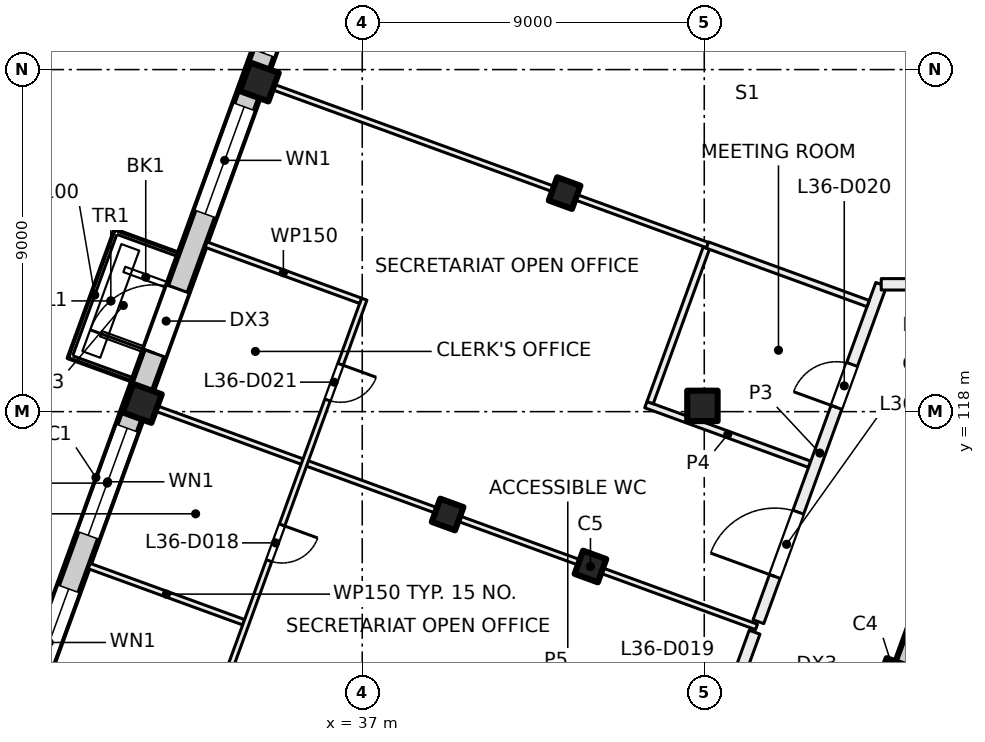
"""IFC4 building model, lengths in metres.
Left out: names, types, materials, properties, quantities, classifications, styles, units other than length and angle.
Written with IfcOpenShell. Run it as: python <this file> out.ifc"""

import sys

from ifc_helpers import new_model, si_unit, direction, frame, frame_2d, origin, origin_2d, place, context, subcontext, project, spatial, rectangle, extrude, element, fill, save


model = new_model("IFC4")
c1 = context("Model", 3, precision=1e-05, world=origin(), true_north=direction((0.0, 1.0)))
c2 = subcontext(c1, "Body", "Model", "MODEL_VIEW")
j1 = project(units=[si_unit("LENGTHUNIT", "METRE"), si_unit("PLANEANGLEUNIT", "RADIAN")], contexts=[c1])
p1 = place(None, origin())
s1 = spatial("IfcSite", under=j1, at=p1, CompositionType="ELEMENT")
p2 = place(p1, origin())
s2 = spatial("IfcBuilding", under=s1, at=p2, CompositionType="ELEMENT")
p3 = place(p2, frame((0.0, 0.0, 154.5)))
s3 = spatial("IfcBuildingStorey", under=s2, at=p3, CompositionType="ELEMENT", Elevation=154.5)
p4 = place(p3, frame((45.952, 118.152, 0.0), z_axis=(0.0, 0.0, 1.0), x_axis=(1.0, 0.0, 0.0)))
e1 = element("IfcColumn", 1, at=p4, inside=s3, PredefinedType="COLUMN", context=c2, shape_type="SweptSolid", body=[
    extrude(rectangle(XDim=0.8, YDim=0.8, at=origin_2d()), origin(), (0.0, 0.0, 1.0), 4.0),
])
for number, where, z_axis, x_axis in (
    (2, (43.006, 113.925, 0.0), (0.0, 0.0, 1.0), (-0.342, -0.94, 0.0)),
    (3, (42.325, 123.751, 0.0), (0.0, 0.0, 1.0), (-0.342, -0.94, 0.0)),
    (4, (39.247, 115.293, 0.0), (0.0, 0.0, 1.0), (-0.342, -0.94, 0.0)),
):
    element("IfcColumn", number, at=place(p3, frame(where, z_axis=z_axis, x_axis=x_axis)), inside=s3, PredefinedType="COLUMN", context=c2, shape_type="SweptSolid", body=[
        extrude(rectangle(XDim=0.65, YDim=0.65, at=origin_2d()), origin(), (0.0, 0.0, 1.0), 4.0),
    ])
for number, where, z_axis, x_axis in (
    (5, (51.04, 111.001, 0.0), (0.0, 0.0, 1.0), (-0.342, -0.94, 0.0)),
    (6, (34.291, 126.675, 0.0), (0.0, 0.0, 1.0), (-0.342, -0.94, 0.0)),
    (7, (31.212, 118.218, 0.0), (0.0, 0.0, 1.0), (-0.342, -0.94, 0.0)),
):
    element("IfcColumn", number, at=place(p3, frame(where, z_axis=z_axis, x_axis=x_axis)), inside=s3, PredefinedType="COLUMN", context=c2, shape_type="SweptSolid", body=[
        extrude(rectangle(XDim=0.8, YDim=0.8, at=origin_2d()), origin(), (0.0, 0.0, 1.0), 4.0),
    ])
p5 = place(p3, frame((52.212, 113.783, 0.0), z_axis=(0.0, 0.0, 1.0), x_axis=(-0.34202521188, -0.939690775968, 0.0)))
e8 = element("IfcWall", 8, at=p5, inside=s3, PredefinedType="SOLIDWALL", context=c2, shape_type="SweptSolid", body=[
    extrude(rectangle(XDim=21.745, YDim=0.6, at=frame_2d((10.873, 0.0))), origin(), (0.0, 0.0, 1.0), 3.625),
])
p6 = place(p5, frame((4.365, 0.0, 0.0)))
e9 = element("IfcOpeningElement", 9, at=p6, cuts=e8, PredefinedType="OPENING", context=c2, shape_type="SweptSolid", body=[
    extrude(rectangle(XDim=1.8, YDim=2.4, at=frame_2d((0.9, 1.2))), frame((0.0, 0.31, 0.0), z_axis=(0.0, -1.0, 0.0), x_axis=(1.0, 0.0, 0.0)), (0.0, 0.0, 1.0), 0.62),
])
p7 = place(p5, frame((8.265, 0.0, 0.9)))
e10 = element("IfcOpeningElement", 10, at=p7, cuts=e8, PredefinedType="OPENING", context=c2, shape_type="SweptSolid", body=[
    extrude(rectangle(XDim=3.0, YDim=2.4, at=frame_2d((1.5, 1.2))), frame((0.0, 0.31, 0.0), z_axis=(0.0, -1.0, 0.0), x_axis=(1.0, 0.0, 0.0)), (0.0, 0.0, 1.0), 0.62),
])
p8 = place(p5, frame((12.765, 0.0, 0.9)))
e11 = element("IfcOpeningElement", 11, at=p8, cuts=e8, PredefinedType="OPENING", context=c2, shape_type="SweptSolid", body=[
    extrude(rectangle(XDim=3.0, YDim=2.4, at=frame_2d((1.5, 1.2))), frame((0.0, 0.31, 0.0), z_axis=(0.0, -1.0, 0.0), x_axis=(1.0, 0.0, 0.0)), (0.0, 0.0, 1.0), 0.62),
])
p9 = place(p5, frame((17.265, 0.0, 0.9)))
e12 = element("IfcOpeningElement", 12, at=p9, cuts=e8, PredefinedType="OPENING", context=c2, shape_type="SweptSolid", body=[
    extrude(rectangle(XDim=3.0, YDim=2.4, at=frame_2d((1.5, 1.2))), frame((0.0, 0.31, 0.0), z_axis=(0.0, -1.0, 0.0), x_axis=(1.0, 0.0, 0.0)), (0.0, 0.0, 1.0), 0.62),
])
p10 = place(p3, frame((24.666, 100.669, 0.0), z_axis=(0.0, 0.0, 1.0), x_axis=(0.34201964167, 0.939692803373, 0.0)))
e13 = element("IfcWall", 13, at=p10, inside=s3, PredefinedType="SOLIDWALL", context=c2, shape_type="SweptSolid", body=[
    extrude(rectangle(XDim=32.884, YDim=0.6, at=frame_2d((16.442, 0.0))), origin(), (0.0, 0.0, 1.0), 3.625),
])
p11 = place(p10, frame((1.48, 0.0, 0.9)))
e14 = element("IfcOpeningElement", 14, at=p11, cuts=e13, PredefinedType="OPENING", context=c2, shape_type="SweptSolid", body=[
    extrude(rectangle(XDim=3.0, YDim=2.4, at=frame_2d((1.5, 1.2))), frame((0.0, 0.31, 0.0), z_axis=(0.0, -1.0, 0.0), x_axis=(1.0, 0.0, 0.0)), (0.0, 0.0, 1.0), 0.62),
])
p12 = place(p10, frame((5.98, 0.0, 0.9)))
e15 = element("IfcOpeningElement", 15, at=p12, cuts=e13, PredefinedType="OPENING", context=c2, shape_type="SweptSolid", body=[
    extrude(rectangle(XDim=3.0, YDim=2.4, at=frame_2d((1.5, 1.2))), frame((0.0, 0.31, 0.0), z_axis=(0.0, -1.0, 0.0), x_axis=(1.0, 0.0, 0.0)), (0.0, 0.0, 1.0), 0.62),
])
p13 = place(p10, frame((10.48, 0.0, 0.9)))
e16 = element("IfcOpeningElement", 16, at=p13, cuts=e13, PredefinedType="OPENING", context=c2, shape_type="SweptSolid", body=[
    extrude(rectangle(XDim=3.0, YDim=2.4, at=frame_2d((1.5, 1.2))), frame((0.0, 0.31, 0.0), z_axis=(0.0, -1.0, 0.0), x_axis=(1.0, 0.0, 0.0)), (0.0, 0.0, 1.0), 0.62),
])
p14 = place(p10, frame((14.98, 0.0, 0.9)))
e17 = element("IfcOpeningElement", 17, at=p14, cuts=e13, PredefinedType="OPENING", context=c2, shape_type="SweptSolid", body=[
    extrude(rectangle(XDim=3.0, YDim=2.4, at=frame_2d((1.5, 1.2))), frame((0.0, 0.31, 0.0), z_axis=(0.0, -1.0, 0.0), x_axis=(1.0, 0.0, 0.0)), (0.0, 0.0, 1.0), 0.62),
])
p15 = place(p10, frame((20.08, 0.0, 0.0)))
e18 = element("IfcOpeningElement", 18, at=p15, cuts=e13, PredefinedType="OPENING", context=c2, shape_type="SweptSolid", body=[
    extrude(rectangle(XDim=1.8, YDim=2.4, at=frame_2d((0.9, 1.2))), frame((0.0, 0.31, 0.0), z_axis=(0.0, -1.0, 0.0), x_axis=(1.0, 0.0, 0.0)), (0.0, 0.0, 1.0), 0.62),
])
p16 = place(p10, frame((23.98, 0.0, 0.9)))
e19 = element("IfcOpeningElement", 19, at=p16, cuts=e13, PredefinedType="OPENING", context=c2, shape_type="SweptSolid", body=[
    extrude(rectangle(XDim=3.0, YDim=2.4, at=frame_2d((1.5, 1.2))), frame((0.0, 0.31, 0.0), z_axis=(0.0, -1.0, 0.0), x_axis=(1.0, 0.0, 0.0)), (0.0, 0.0, 1.0), 0.62),
])
p17 = place(p10, frame((28.48, 0.0, 0.9)))
e20 = element("IfcOpeningElement", 20, at=p17, cuts=e13, PredefinedType="OPENING", context=c2, shape_type="SweptSolid", body=[
    extrude(rectangle(XDim=3.0, YDim=2.4, at=frame_2d((1.5, 1.2))), frame((0.0, 0.31, 0.0), z_axis=(0.0, -1.0, 0.0), x_axis=(1.0, 0.0, 0.0)), (0.0, 0.0, 1.0), 0.62),
])
p18 = place(p3, frame((29.814, 113.938, 0.0), z_axis=(0.0, 0.0, 1.0), x_axis=(0.93973078783, -0.341915262023, 0.0)))
e21 = element("IfcWall", 21, at=p18, inside=s3, PredefinedType="PARTITIONING", context=c2, shape_type="SweptSolid", body=[
    extrude(rectangle(XDim=4.326, YDim=0.15, at=frame_2d((2.163, 0.0))), origin(), (0.0, 0.0, 1.0), 3.625),
])
p19 = place(p3, frame((31.353, 118.166, 0.0), z_axis=(0.0, 0.0, 1.0), x_axis=(0.939701413127, -0.341995985602, 0.0)))
e22 = element("IfcWall", 22, at=p19, inside=s3, PredefinedType="PARTITIONING", context=c2, shape_type="SweptSolid", body=[
    extrude(rectangle(XDim=17.05, YDim=0.15, at=frame_2d((8.525, 0.0))), origin(), (0.0, 0.0, 1.0), 3.625),
])
p20 = place(p3, frame((37.053, 120.96, 0.0), z_axis=(0.0, 0.0, 1.0), x_axis=(-0.342023551531, -0.939691380293, 0.0)))
e23 = element("IfcWall", 23, at=p20, inside=s3, PredefinedType="PARTITIONING", context=c2, shape_type="SweptSolid", body=[
    extrude(rectangle(XDim=13.488, YDim=0.15, at=frame_2d((6.744, 0.0))), origin(), (0.0, 0.0, 1.0), 3.625),
])
p21 = place(p20, frame((10.791, 0.0, 0.0)))
e24 = element("IfcOpeningElement", 24, at=p21, cuts=e23, PredefinedType="OPENING", context=c2, shape_type="SweptSolid", body=[
    extrude(rectangle(XDim=1.0, YDim=2.1, at=frame_2d((0.5, 1.05))), frame((0.0, 0.085, 0.0), z_axis=(0.0, -1.0, 0.0), x_axis=(1.0, 0.0, 0.0)), (0.0, 0.0, 1.0), 0.17),
])
p22 = place(p20, frame((6.324, 0.0, 0.0)))
e25 = element("IfcOpeningElement", 25, at=p22, cuts=e23, PredefinedType="OPENING", context=c2, shape_type="SweptSolid", body=[
    extrude(rectangle(XDim=1.0, YDim=2.1, at=frame_2d((0.5, 1.05))), frame((0.0, 0.085, 0.0), z_axis=(0.0, -1.0, 0.0), x_axis=(1.0, 0.0, 0.0)), (0.0, 0.0, 1.0), 0.17),
])
p23 = place(p20, frame((1.824, 0.0, 0.0)))
e26 = element("IfcOpeningElement", 26, at=p23, cuts=e23, PredefinedType="OPENING", context=c2, shape_type="SweptSolid", body=[
    extrude(rectangle(XDim=1.0, YDim=2.1, at=frame_2d((0.5, 1.05))), frame((0.0, 0.085, 0.0), z_axis=(0.0, -1.0, 0.0), x_axis=(1.0, 0.0, 0.0)), (0.0, 0.0, 1.0), 0.17),
])
p24 = place(p3, frame((32.892, 122.395, 0.0), z_axis=(0.0, 0.0, 1.0), x_axis=(0.93973078783, -0.341915262023, 0.0)))
e27 = element("IfcWall", 27, at=p24, inside=s3, PredefinedType="PARTITIONING", context=c2, shape_type="SweptSolid", body=[
    extrude(rectangle(XDim=4.326, YDim=0.15, at=frame_2d((2.163, 0.0))), origin(), (0.0, 0.0, 1.0), 3.625),
])
p25 = place(p3, frame((47.325, 112.197, 0.0), z_axis=(0.0, 0.0, 1.0), x_axis=(-0.341976837053, -0.93970838185, 0.0)))
e28 = element("IfcWall", 28, at=p25, inside=s3, PredefinedType="PARTITIONING", context=c2, shape_type="SweptSolid", body=[
    extrude(rectangle(XDim=13.416, YDim=0.3, at=frame_2d((6.708, 0.0))), origin(), (0.0, 0.0, 1.0), 3.625),
])
p26 = place(p25, frame((8.354, 0.0, 0.0)))
e29 = element("IfcOpeningElement", 29, at=p26, cuts=e28, PredefinedType="OPENING", context=c2, shape_type="SweptSolid", body=[
    extrude(rectangle(XDim=1.0, YDim=2.1, at=frame_2d((0.5, 1.05))), frame((0.0, 0.16, 0.0), z_axis=(0.0, -1.0, 0.0), x_axis=(1.0, 0.0, 0.0)), (0.0, 0.0, 1.0), 0.32),
])
p27 = place(p25, frame((1.267, 0.0, 0.0)))
e30 = element("IfcOpeningElement", 30, at=p27, cuts=e28, PredefinedType="OPENING", context=c2, shape_type="SweptSolid", body=[
    extrude(rectangle(XDim=1.8, YDim=2.1, at=frame_2d((0.9, 1.05))), frame((0.0, 0.16, 0.0), z_axis=(0.0, -1.0, 0.0), x_axis=(1.0, 0.0, 0.0)), (0.0, 0.0, 1.0), 0.32),
])
p28 = place(p3, frame((44.463, 118.184, 0.0), z_axis=(0.0, 0.0, 1.0), x_axis=(0.939667480086, -0.342089208934, 0.0)))
e31 = element("IfcWall", 31, at=p28, inside=s3, PredefinedType="PARTITIONING", context=c2, shape_type="SweptSolid", body=[
    extrude(rectangle(XDim=4.587, YDim=0.175, at=frame_2d((2.293, 0.0))), origin(), (0.0, 0.0, 1.0), 3.625),
])
p29 = place(p3, frame((46.084, 122.383, 0.0), z_axis=(0.0, 0.0, 1.0), x_axis=(-0.939703144457, 0.341991228392, 0.0)))
e32 = element("IfcWall", 32, at=p29, inside=s3, PredefinedType="PARTITIONING", context=c2, shape_type="SweptSolid", body=[
    extrude(rectangle(XDim=12.401, YDim=0.15, at=frame_2d((6.2, 0.0))), origin(), (0.0, 0.0, 1.0), 3.625),
])
p30 = place(p3, frame((46.054, 122.301, 0.0), z_axis=(0.0, 0.0, 1.0), x_axis=(-0.341915262023, -0.93973078783, 0.0)))
e33 = element("IfcWall", 33, at=p30, inside=s3, PredefinedType="PARTITIONING", context=c2, shape_type="SweptSolid", body=[
    extrude(rectangle(XDim=4.326, YDim=0.175, at=frame_2d((2.163, 0.0))), origin(), (0.0, 0.0, 1.0), 3.625),
])
p31 = place(p3, frame((47.425, 112.473, 0.0), z_axis=(0.0, 0.0, 1.0), x_axis=(0.342087569587, 0.939668076894, 0.0)))
e34 = element("IfcWall", 34, at=p31, inside=s3, PredefinedType="PARTITIONING", context=c2, shape_type="SweptSolid", body=[
    extrude(rectangle(XDim=9.445, YDim=0.3, at=frame_2d((4.722, 0.0))), origin(), (0.0, 0.0, 1.0), 3.625),
])
p32 = place(p31, frame((6.003, 0.0, 0.0)))
e35 = element("IfcOpeningElement", 35, at=p32, cuts=e34, PredefinedType="OPENING", context=c2, shape_type="SweptSolid", body=[
    extrude(rectangle(XDim=1.2, YDim=2.1, at=frame_2d((0.6, 1.05))), frame((0.0, 0.16, 0.0), z_axis=(0.0, -1.0, 0.0), x_axis=(1.0, 0.0, 0.0)), (0.0, 0.0, 1.0), 0.32),
])
p33 = place(p31, frame((1.267, 0.0, 0.0)))
e36 = element("IfcOpeningElement", 36, at=p33, cuts=e34, PredefinedType="OPENING", context=c2, shape_type="SweptSolid", body=[
    extrude(rectangle(XDim=1.8, YDim=2.1, at=frame_2d((0.9, 1.05))), frame((0.0, 0.16, 0.0), z_axis=(0.0, -1.0, 0.0), x_axis=(1.0, 0.0, 0.0)), (0.0, 0.0, 1.0), 0.32),
])
p34 = place(p3, frame((50.312, 120.843, 0.0), z_axis=(0.0, 0.0, 1.0), x_axis=(-0.939609529273, 0.342248349154, 0.0)))
e37 = element("IfcWall", 37, at=p34, inside=s3, PredefinedType="PARTITIONING", context=c2, shape_type="SweptSolid", body=[
    extrude(rectangle(XDim=4.5, YDim=0.175, at=frame_2d((2.25, 0.0))), origin(), (0.0, 0.0, 1.0), 3.625),
])
p35 = place(p3, frame((50.657, 121.35, 0.0), z_axis=(0.0, 0.0, 1.0), x_axis=(1.0, 0.0, 0.0)))
e38 = element("IfcWall", 38, at=p35, inside=s3, PredefinedType="PARTITIONING", context=c2, shape_type="SweptSolid", body=[
    extrude(rectangle(XDim=35.096, YDim=0.3, at=frame_2d((17.548, 0.0))), origin(), (0.0, 0.0, 1.0), 3.625),
])
p36 = place(p35, frame((26.243, 0.0, 0.0)))
e39 = element("IfcOpeningElement", 39, at=p36, cuts=e38, PredefinedType="OPENING", context=c2, shape_type="SweptSolid", body=[
    extrude(rectangle(XDim=1.2, YDim=2.1, at=frame_2d((0.6, 1.05))), frame((0.0, 0.16, 0.0), z_axis=(0.0, -1.0, 0.0), x_axis=(1.0, 0.0, 0.0)), (0.0, 0.0, 1.0), 0.32),
])
p37 = place(p35, frame((22.593, 0.0, 0.0)))
e40 = element("IfcOpeningElement", 40, at=p37, cuts=e38, PredefinedType="OPENING", context=c2, shape_type="SweptSolid", body=[
    extrude(rectangle(XDim=1.0, YDim=2.1, at=frame_2d((0.5, 1.05))), frame((0.0, 0.16, 0.0), z_axis=(0.0, -1.0, 0.0), x_axis=(1.0, 0.0, 0.0)), (0.0, 0.0, 1.0), 0.32),
])
p38 = place(p35, frame((31.193, 0.0, 0.0)))
e41 = element("IfcOpeningElement", 41, at=p38, cuts=e38, PredefinedType="OPENING", context=c2, shape_type="SweptSolid", body=[
    extrude(rectangle(XDim=1.8, YDim=2.1, at=frame_2d((0.9, 1.05))), frame((0.0, 0.16, 0.0), z_axis=(0.0, -1.0, 0.0), x_axis=(1.0, 0.0, 0.0)), (0.0, 0.0, 1.0), 0.32),
])
p39 = place(p35, frame((18.743, 0.0, 0.0)))
e42 = element("IfcOpeningElement", 42, at=p39, cuts=e38, PredefinedType="OPENING", context=c2, shape_type="SweptSolid", body=[
    extrude(rectangle(XDim=1.2, YDim=2.1, at=frame_2d((0.6, 1.05))), frame((0.0, 0.16, 0.0), z_axis=(0.0, -1.0, 0.0), x_axis=(1.0, 0.0, 0.0)), (0.0, 0.0, 1.0), 0.32),
])
p40 = place(p35, frame((14.243, 0.0, 0.0)))
e43 = element("IfcOpeningElement", 43, at=p40, cuts=e38, PredefinedType="OPENING", context=c2, shape_type="SweptSolid", body=[
    extrude(rectangle(XDim=1.2, YDim=2.1, at=frame_2d((0.6, 1.05))), frame((0.0, 0.16, 0.0), z_axis=(0.0, -1.0, 0.0), x_axis=(1.0, 0.0, 0.0)), (0.0, 0.0, 1.0), 0.32),
])
p41 = place(p35, frame((10.693, 0.0, 0.0)))
e44 = element("IfcOpeningElement", 44, at=p41, cuts=e38, PredefinedType="OPENING", context=c2, shape_type="SweptSolid", body=[
    extrude(rectangle(XDim=0.8, YDim=2.1, at=frame_2d((0.4, 1.05))), frame((0.0, 0.16, 0.0), z_axis=(0.0, -1.0, 0.0), x_axis=(1.0, 0.0, 0.0)), (0.0, 0.0, 1.0), 0.32),
])
p42 = place(p35, frame((5.693, 0.0, 0.0)))
e45 = element("IfcOpeningElement", 45, at=p42, cuts=e38, PredefinedType="OPENING", context=c2, shape_type="SweptSolid", body=[
    extrude(rectangle(XDim=1.8, YDim=2.1, at=frame_2d((0.9, 1.05))), frame((0.0, 0.16, 0.0), z_axis=(0.0, -1.0, 0.0), x_axis=(1.0, 0.0, 0.0)), (0.0, 0.0, 1.0), 0.32),
])
p43 = place(p35, frame((0.896, 0.0, 0.0)))
e46 = element("IfcOpeningElement", 46, at=p43, cuts=e38, PredefinedType="OPENING", context=c2, shape_type="SweptSolid", body=[
    extrude(rectangle(XDim=1.8, YDim=2.1, at=frame_2d((0.9, 1.05))), frame((0.0, 0.16, 0.0), z_axis=(0.0, -1.0, 0.0), x_axis=(1.0, 0.0, 0.0)), (0.0, 0.0, 1.0), 0.32),
])
p44 = place(p13, origin())
e47 = element("IfcWindow", 47, at=p44, inside=s3, PartitioningType="SINGLE_PANEL", PredefinedType="WINDOW", context=c2, shape_type="SweptSolid", body=[
    extrude(rectangle(XDim=3.0, YDim=2.4, at=frame_2d((1.5, 1.2))), frame((0.0, 0.03, 0.0), z_axis=(0.0, -1.0, 0.0), x_axis=(1.0, 0.0, 0.0)), (0.0, 0.0, 1.0), 0.06),
])
fill(e16, e47)
p45 = place(p14, origin())
e48 = element("IfcWindow", 48, at=p45, inside=s3, PartitioningType="SINGLE_PANEL", PredefinedType="WINDOW", context=c2, shape_type="SweptSolid", body=[
    extrude(rectangle(XDim=3.0, YDim=2.4, at=frame_2d((1.5, 1.2))), frame((0.0, 0.03, 0.0), z_axis=(0.0, -1.0, 0.0), x_axis=(1.0, 0.0, 0.0)), (0.0, 0.0, 1.0), 0.06),
])
fill(e17, e48)
p46 = place(p15, origin())
e49 = element("IfcDoor", 49, at=p46, inside=s3, OperationType="DOUBLE_DOOR_SINGLE_SWING", PredefinedType="DOOR", context=c2, shape_type="SweptSolid", body=[
    extrude(rectangle(XDim=1.8, YDim=2.4, at=frame_2d((0.9, 1.2))), frame((0.0, 0.025, 0.0), z_axis=(0.0, -1.0, 0.0), x_axis=(1.0, 0.0, 0.0)), (0.0, 0.0, 1.0), 0.05),
])
fill(e18, e49)
p47 = place(p16, origin())
e50 = element("IfcWindow", 50, at=p47, inside=s3, PartitioningType="SINGLE_PANEL", PredefinedType="WINDOW", context=c2, shape_type="SweptSolid", body=[
    extrude(rectangle(XDim=3.0, YDim=2.4, at=frame_2d((1.5, 1.2))), frame((0.0, 0.03, 0.0), z_axis=(0.0, -1.0, 0.0), x_axis=(1.0, 0.0, 0.0)), (0.0, 0.0, 1.0), 0.06),
])
fill(e19, e50)
p48 = place(p17, origin())
e51 = element("IfcWindow", 51, at=p48, inside=s3, PartitioningType="SINGLE_PANEL", PredefinedType="WINDOW", context=c2, shape_type="SweptSolid", body=[
    extrude(rectangle(XDim=3.0, YDim=2.4, at=frame_2d((1.5, 1.2))), frame((0.0, 0.03, 0.0), z_axis=(0.0, -1.0, 0.0), x_axis=(1.0, 0.0, 0.0)), (0.0, 0.0, 1.0), 0.06),
])
fill(e20, e51)
p49 = place(p22, origin())
e52 = element("IfcDoor", 52, at=p49, inside=s3, OperationType="SINGLE_SWING_RIGHT", PredefinedType="DOOR", context=c2, shape_type="SweptSolid", body=[
    extrude(rectangle(XDim=1.0, YDim=2.1, at=frame_2d((0.5, 1.05))), frame((0.0, 0.025, 0.0), z_axis=(0.0, -1.0, 0.0), x_axis=(1.0, 0.0, 0.0)), (0.0, 0.0, 1.0), 0.05),
])
fill(e25, e52)
p50 = place(p32, origin())
e53 = element("IfcDoor", 53, at=p50, inside=s3, OperationType="DOUBLE_DOOR_SINGLE_SWING", PredefinedType="DOOR", context=c2, shape_type="SweptSolid", body=[
    extrude(rectangle(XDim=1.2, YDim=2.1, at=frame_2d((0.6, 1.05))), frame((0.0, 0.025, 0.0), z_axis=(0.0, -1.0, 0.0), x_axis=(1.0, 0.0, 0.0)), (0.0, 0.0, 1.0), 0.05),
])
fill(e35, e53)
p51 = place(p23, origin())
e54 = element("IfcDoor", 54, at=p51, inside=s3, OperationType="SINGLE_SWING_LEFT", PredefinedType="DOOR", context=c2, shape_type="SweptSolid", body=[
    extrude(rectangle(XDim=1.0, YDim=2.1, at=frame_2d((0.5, 1.05))), frame((0.0, 0.025, 0.0), z_axis=(0.0, -1.0, 0.0), x_axis=(1.0, 0.0, 0.0)), (0.0, 0.0, 1.0), 0.05),
])
fill(e26, e54)
p52 = place(p33, origin())
e55 = element("IfcDoor", 55, at=p52, inside=s3, OperationType="DOUBLE_DOOR_SINGLE_SWING", PredefinedType="DOOR", context=c2, shape_type="SweptSolid", body=[
    extrude(rectangle(XDim=1.8, YDim=2.1, at=frame_2d((0.9, 1.05))), frame((0.0, 0.025, 0.0), z_axis=(0.0, -1.0, 0.0), x_axis=(1.0, 0.0, 0.0)), (0.0, 0.0, 1.0), 0.05),
])
fill(e36, e55)
save(model, sys.argv[1])
